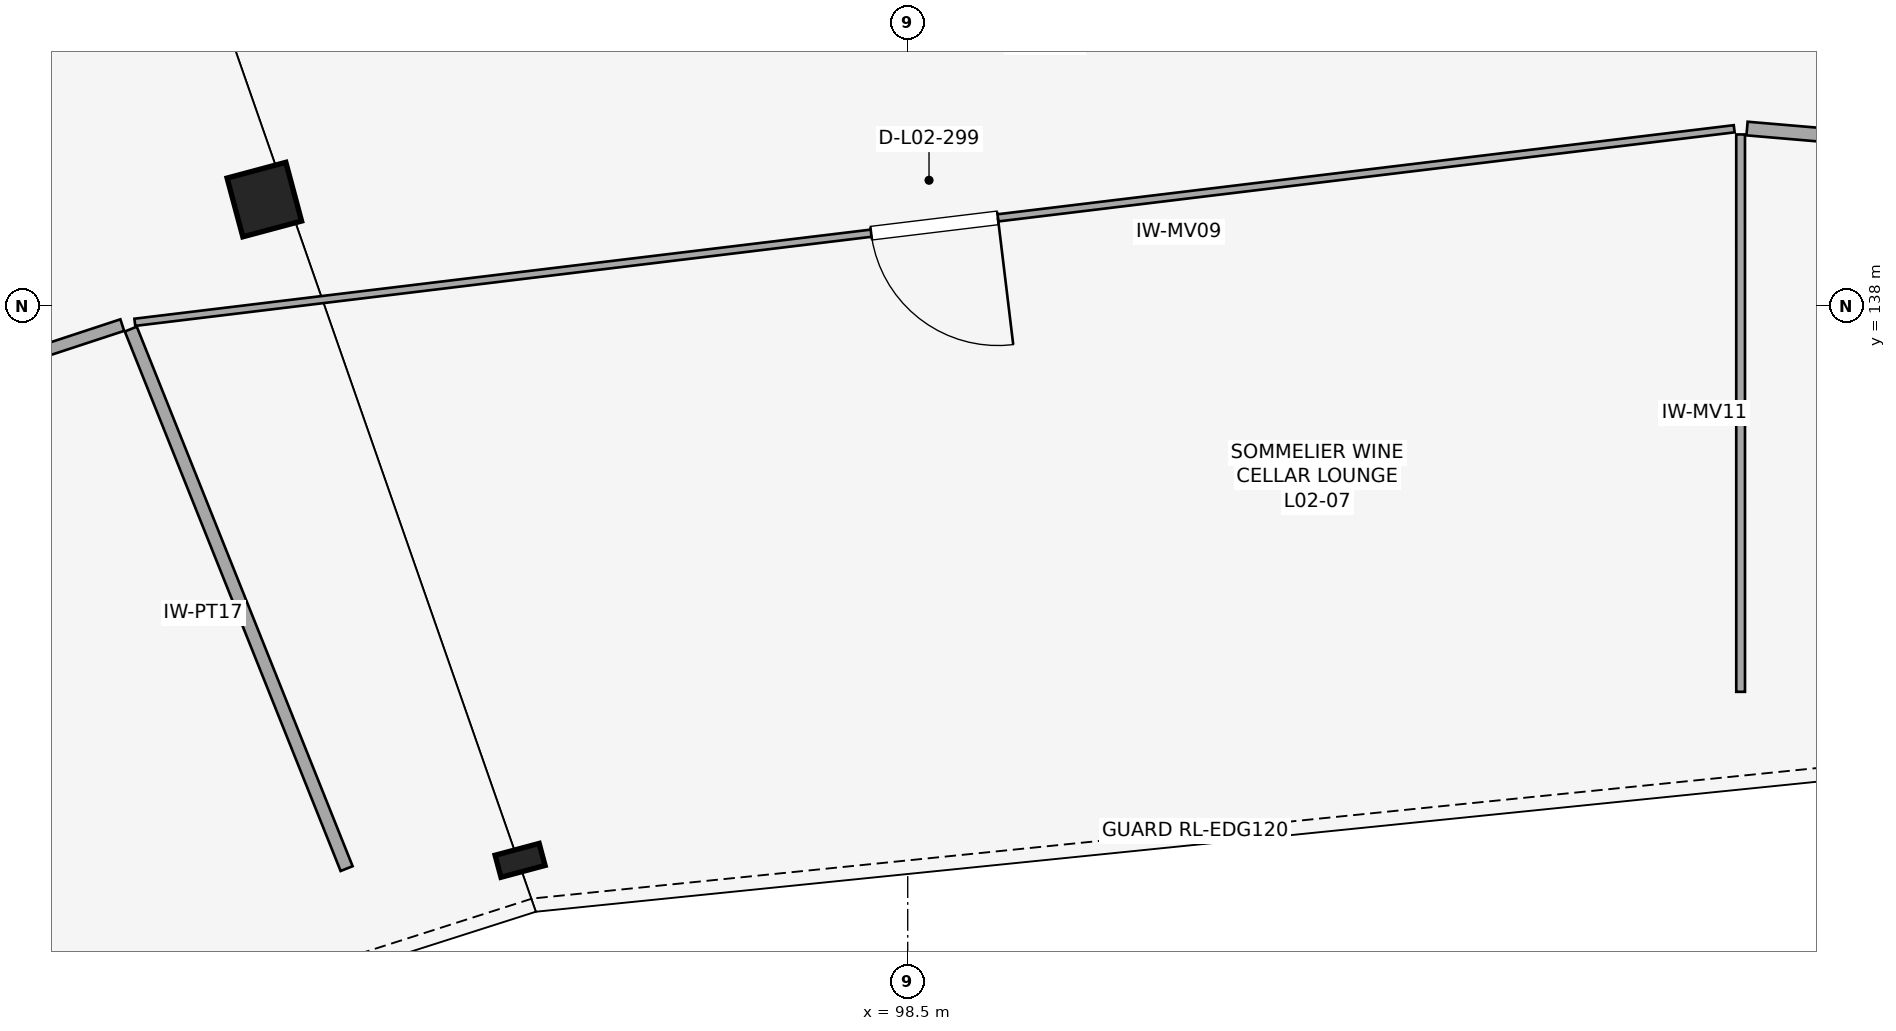
"""IFC4 building model, lengths in metres.
Left out: names, types, materials, properties, quantities, classifications, styles, units other than length and angle.
Written with IfcOpenShell. Run it as: python <this file> out.ifc"""

import sys

from ifc_helpers import new_model, si_unit, direction, frame, frame_2d, origin, origin_2d, place, context, subcontext, project, spatial, rectangle, i_section, extrude, element, fill, save


model = new_model("IFC4")
c1 = context("Model", 3, precision=1e-05, world=origin(), true_north=direction((0.0, 1.0)))
c2 = subcontext(c1, "Body", "Model", "MODEL_VIEW")
j1 = project(units=[si_unit("LENGTHUNIT", "METRE"), si_unit("PLANEANGLEUNIT", "RADIAN")], contexts=[c1])
p1 = place(None, origin())
s1 = spatial("IfcSite", under=j1, at=p1, CompositionType="ELEMENT")
p2 = place(p1, origin())
s2 = spatial("IfcBuilding", under=s1, at=p2, CompositionType="ELEMENT")
p3 = place(p2, frame((0.0, 0.0, 10.6)))
s3 = spatial("IfcBuildingStorey", under=s2, at=p3, CompositionType="ELEMENT", Elevation=10.6)
p4 = place(p3, frame((93.4, 130.711, 0.0), z_axis=(0.0, 0.0, 1.0), x_axis=(-0.258819045103, 0.965925826289, 0.0)))
e1 = element("IfcColumn", 1, at=p4, inside=s3, PredefinedType="COLUMN", context=c2, shape_type="SweptSolid", body=[
    extrude(i_section(OverallWidth=0.3, OverallDepth=0.6, WebThickness=0.015, FlangeThickness=0.03, FilletRadius=0.027, at=origin_2d()), origin(), (0.0, 0.0, 1.0), 5.0),
])
p5 = place(p3, frame((90.036, 139.404, 0.0), z_axis=(0.0, 0.0, 1.0), x_axis=(-0.258819045103, 0.965925826289, 0.0)))
e2 = element("IfcColumn", 2, at=p5, inside=s3, PredefinedType="COLUMN", context=c2, shape_type="SweptSolid", body=[
    extrude(rectangle(XDim=0.8, YDim=0.8, at=origin_2d()), origin(), (0.0, 0.0, 1.0), 5.0),
])
p6 = place(p3, frame((119.115, 139.522, 0.0), z_axis=(0.0, 0.0, 1.0), x_axis=(-0.996376733789, 0.08504942307, 0.0)))
e3 = element("IfcWall", 3, at=p6, inside=s3, PredefinedType="PARTITIONING", context=c2, shape_type="SweptSolid", body=[
    extrude(rectangle(XDim=9.608, YDim=0.18, at=frame_2d((4.804, 0.0))), origin(), (0.0, 0.0, 1.0), 3.47),
])
p7 = place(p6, frame((1.1, 0.0, 0.0)))
e4 = element("IfcOpeningElement", 4, at=p7, cuts=e3, PredefinedType="OPENING", context=c2, shape_type="SweptSolid", body=[
    extrude(rectangle(XDim=1.34, YDim=2.38, at=frame_2d((0.67, 1.19))), frame((0.0, 0.1, 0.0), z_axis=(0.0, -1.0, 0.0), x_axis=(1.0, 0.0, 0.0)), (0.0, 0.0, 1.0), 0.2),
])
p8 = place(p3, frame((109.458, 132.928, 0.0), z_axis=(0.0, 0.0, 1.0), x_axis=(-3.329449e-05, 0.999999999446, 0.0)))
e5 = element("IfcWall", 5, at=p8, inside=s3, PredefinedType="MOVABLE", context=c2, shape_type="SweptSolid", body=[
    extrude(rectangle(XDim=7.333, YDim=0.115, at=frame_2d((3.667, 0.0))), origin(), (0.0, 0.0, 1.0), 3.47),
])
p9 = place(p3, frame((109.373, 140.336, 0.0), z_axis=(0.0, 0.0, 1.0), x_axis=(-0.99275686383, -0.120140789568, 0.0)))
e6 = element("IfcWall", 6, at=p9, inside=s3, PredefinedType="MOVABLE", context=c2, shape_type="SweptSolid", body=[
    extrude(rectangle(XDim=21.195, YDim=0.095, at=frame_2d((10.598, 0.0))), origin(), (0.0, 0.0, 1.0), 3.47),
])
p10 = place(p9, frame((9.758, 0.0, 0.0)))
e7 = element("IfcOpeningElement", 7, at=p10, cuts=e6, PredefinedType="OPENING", context=c2, shape_type="SweptSolid", body=[
    extrude(rectangle(XDim=1.68, YDim=2.24, at=frame_2d((0.84, 1.12))), frame((0.0, 0.057, 0.0), z_axis=(0.0, -1.0, 0.0), x_axis=(1.0, 0.0, 0.0)), (0.0, 0.0, 1.0), 0.115),
])
p11 = place(p3, frame((91.118, 130.602, 0.0), z_axis=(0.0, 0.0, 1.0), x_axis=(-0.371401688327, 0.92847228602, 0.0)))
e8 = element("IfcWall", 8, at=p11, inside=s3, PredefinedType="PARTITIONING", context=c2, shape_type="SweptSolid", body=[
    extrude(rectangle(XDim=7.645, YDim=0.17, at=frame_2d((3.823, 0.0))), origin(), (0.0, 0.0, 1.0), 3.47),
])
p12 = place(p3, frame((88.167, 137.753, 0.0), z_axis=(0.0, 0.0, 1.0), x_axis=(-0.949992120634, -0.31227387136, 0.0)))
e9 = element("IfcWall", 9, at=p12, inside=s3, PredefinedType="PARTITIONING", context=c2, shape_type="SweptSolid", body=[
    extrude(rectangle(XDim=18.926, YDim=0.16, at=frame_2d((9.463, 0.0))), origin(), (0.0, 0.0, 1.0), 3.47),
])
p13 = place(p12, frame((8.743, 0.0, 0.0)))
e10 = element("IfcOpeningElement", 10, at=p13, cuts=e9, PredefinedType="OPENING", context=c2, shape_type="SweptSolid", body=[
    extrude(rectangle(XDim=1.44, YDim=2.1, at=frame_2d((0.72, 1.05))), frame((0.0, 0.09, 0.0), z_axis=(0.0, -1.0, 0.0), x_axis=(1.0, 0.0, 0.0)), (0.0, 0.0, 1.0), 0.18),
])
p14 = place(p10, origin())
e11 = element("IfcDoor", 11, at=p14, inside=s3, OperationType="SINGLE_SWING_LEFT", PredefinedType="DOOR", context=c2, shape_type="SweptSolid", body=[
    extrude(rectangle(XDim=1.68, YDim=2.24, at=frame_2d((0.84, 1.12))), frame((0.0, 0.025, 0.0), z_axis=(0.0, -1.0, 0.0), x_axis=(1.0, 0.0, 0.0)), (0.0, 0.0, 1.0), 0.05),
])
fill(e7, e11)
save(model, sys.argv[1])
